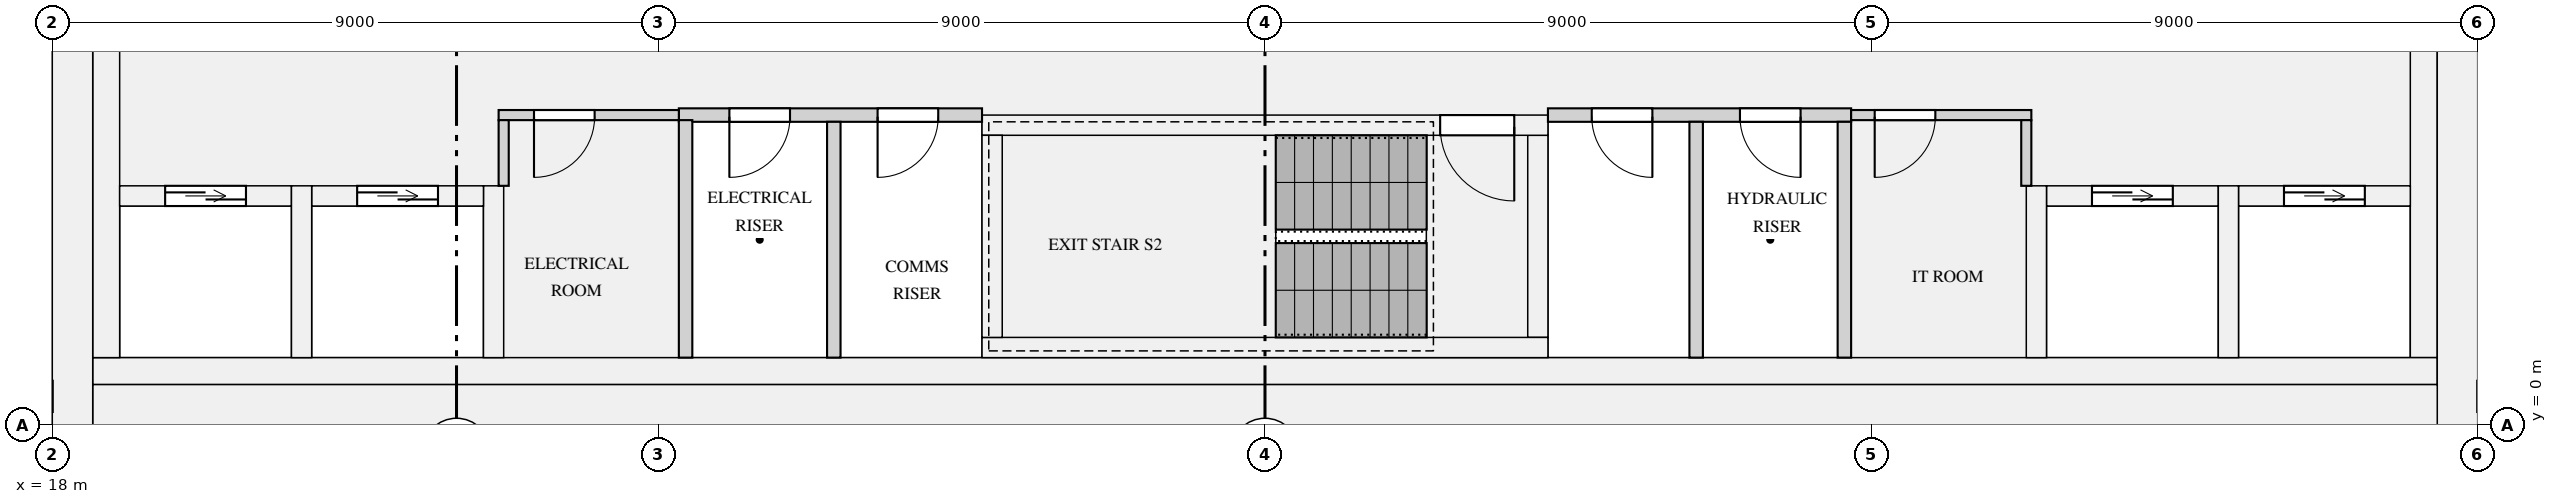
"""IFC4 building model, lengths in metres.
Left out: names, types, materials, properties, quantities, classifications, styles, units other than length and angle.
Written with IfcOpenShell. Run it as: python <this file> out.ifc"""

import sys

from ifc_helpers import new_model, si_unit, direction, frame, frame_2d, origin, place, context, subcontext, project, spatial, rectangle, extrude, element, fill, save


model = new_model("IFC4")
c1 = context("Model", 3, precision=1e-05, world=origin(), true_north=direction((0.0, 1.0)))
c2 = subcontext(c1, "Body", "Model", "MODEL_VIEW")
j1 = project(units=[si_unit("LENGTHUNIT", "METRE"), si_unit("PLANEANGLEUNIT", "RADIAN")], contexts=[c1])
p1 = place(None, origin())
s1 = spatial("IfcSite", under=j1, at=p1, CompositionType="ELEMENT")
p2 = place(p1, origin())
s2 = spatial("IfcBuilding", under=s1, at=p2, CompositionType="ELEMENT")
p3 = place(p2, frame((0.0, 0.0, 223.2)))
s3 = spatial("IfcBuildingStorey", under=s2, at=p3, CompositionType="ELEMENT", Elevation=223.2)
for number, where, z_axis, x_axis in (
    (1, (18.3, 0.0, 0.0), (0.0, 0.0, 1.0), (0.0, 1.0, 0.0)),
    (2, (53.7, 0.0, 0.0), (0.0, 0.0, 1.0), (0.0, 1.0, 0.0)),
):
    element("IfcWall", number, at=place(p3, frame(where, z_axis=z_axis, x_axis=x_axis)), inside=s3, PredefinedType="SHEAR", context=c2, shape_type="SweptSolid", body=[
        extrude(rectangle(XDim=12.5, YDim=0.6, at=frame_2d((6.25, 0.0))), origin(), (0.0, 0.0, 1.0), 3.15),
    ])
p4 = place(p3, frame((18.6, 0.3, 0.0), z_axis=(0.0, 0.0, 1.0), x_axis=(1.0, 0.0, 0.0)))
e3 = element("IfcWall", 3, at=p4, inside=s3, PredefinedType="SHEAR", context=c2, shape_type="SweptSolid", body=[
    extrude(rectangle(XDim=34.8, YDim=0.6, at=frame_2d((17.4, 0.0))), origin(), (0.0, 0.0, 1.0), 3.15),
])
for number, where, z_axis, x_axis in (
    (4, (18.8, 1.0, 0.0), (0.0, 0.0, 1.0), (0.0, 1.0, 0.0)),
    (5, (53.2, 1.0, 0.0), (0.0, 0.0, 1.0), (0.0, 1.0, 0.0)),
):
    element("IfcWall", number, at=place(p3, frame(where, z_axis=z_axis, x_axis=x_axis)), inside=s3, PredefinedType="SHEAR", context=c2, shape_type="SweptSolid", body=[
        extrude(rectangle(XDim=10.9, YDim=0.4, at=frame_2d((5.45, 0.0))), origin(), (0.0, 0.0, 1.0), 3.15),
    ])
p5 = place(p3, frame((18.6, 0.8, 0.0), z_axis=(0.0, 0.0, 1.0), x_axis=(1.0, 0.0, 0.0)))
e6 = element("IfcWall", 6, at=p5, inside=s3, PredefinedType="SHEAR", context=c2, shape_type="SweptSolid", body=[
    extrude(rectangle(XDim=34.8, YDim=0.4, at=frame_2d((17.4, 0.0))), origin(), (0.0, 0.0, 1.0), 3.15),
])
p6 = place(p3, frame((19.0, 3.4, 0.0), z_axis=(0.0, 0.0, 1.0), x_axis=(1.0, 0.0, 0.0)))
e7 = element("IfcWall", 7, at=p6, inside=s3, PredefinedType="SHEAR", context=c2, shape_type="SweptSolid", body=[
    extrude(rectangle(XDim=2.55, YDim=0.3, at=frame_2d((1.275, 0.0))), origin(), (0.0, 0.0, 1.0), 3.15),
])
p7 = place(p6, frame((0.675, 0.0, 0.0)))
e8 = element("IfcOpeningElement", 8, at=p7, cuts=e7, PredefinedType="OPENING", context=c2, shape_type="SweptSolid", body=[
    extrude(rectangle(XDim=1.2, YDim=2.1, at=frame_2d((0.6, 1.05))), frame((0.0, 0.16, 0.0), z_axis=(0.0, -1.0, 0.0), x_axis=(1.0, 0.0, 0.0)), (0.0, 0.0, 1.0), 0.32),
])
p8 = place(p3, frame((21.85, 3.4, 0.0), z_axis=(0.0, 0.0, 1.0), x_axis=(1.0, 0.0, 0.0)))
e9 = element("IfcWall", 9, at=p8, inside=s3, PredefinedType="SHEAR", context=c2, shape_type="SweptSolid", body=[
    extrude(rectangle(XDim=2.55, YDim=0.3, at=frame_2d((1.275, 0.0))), origin(), (0.0, 0.0, 1.0), 3.15),
])
p9 = place(p8, frame((0.675, 0.0, 0.0)))
e10 = element("IfcOpeningElement", 10, at=p9, cuts=e9, PredefinedType="OPENING", context=c2, shape_type="SweptSolid", body=[
    extrude(rectangle(XDim=1.2, YDim=2.1, at=frame_2d((0.6, 1.05))), frame((0.0, 0.16, 0.0), z_axis=(0.0, -1.0, 0.0), x_axis=(1.0, 0.0, 0.0)), (0.0, 0.0, 1.0), 0.32),
])
for number, where, z_axis, x_axis in (
    (11, (21.7, 1.0, 0.0), (0.0, 0.0, 1.0), (0.0, 1.0, 0.0)),
    (12, (24.55, 1.0, 0.0), (0.0, 0.0, 1.0), (0.0, 1.0, 0.0)),
):
    element("IfcWall", number, at=place(p3, frame(where, z_axis=z_axis, x_axis=x_axis)), inside=s3, PredefinedType="SHEAR", context=c2, shape_type="SweptSolid", body=[
        extrude(rectangle(XDim=2.55, YDim=0.3, at=frame_2d((1.275, 0.0))), origin(), (0.0, 0.0, 1.0), 3.15),
    ])
p10 = place(p3, frame((47.6, 3.4, 0.0), z_axis=(0.0, 0.0, 1.0), x_axis=(1.0, 0.0, 0.0)))
e13 = element("IfcWall", 13, at=p10, inside=s3, PredefinedType="SHEAR", context=c2, shape_type="SweptSolid", body=[
    extrude(rectangle(XDim=2.55, YDim=0.3, at=frame_2d((1.275, 0.0))), origin(), (0.0, 0.0, 1.0), 3.15),
])
p11 = place(p10, frame((0.675, 0.0, 0.0)))
e14 = element("IfcOpeningElement", 14, at=p11, cuts=e13, PredefinedType="OPENING", context=c2, shape_type="SweptSolid", body=[
    extrude(rectangle(XDim=1.2, YDim=2.1, at=frame_2d((0.6, 1.05))), frame((0.0, 0.16, 0.0), z_axis=(0.0, -1.0, 0.0), x_axis=(1.0, 0.0, 0.0)), (0.0, 0.0, 1.0), 0.32),
])
p12 = place(p3, frame((47.45, 1.0, 0.0), z_axis=(0.0, 0.0, 1.0), x_axis=(0.0, 1.0, 0.0)))
e15 = element("IfcWall", 15, at=p12, inside=s3, PredefinedType="SHEAR", context=c2, shape_type="SweptSolid", body=[
    extrude(rectangle(XDim=2.55, YDim=0.3, at=frame_2d((1.275, 0.0))), origin(), (0.0, 0.0, 1.0), 3.15),
])
p13 = place(p3, frame((50.45, 3.4, 0.0), z_axis=(0.0, 0.0, 1.0), x_axis=(1.0, 0.0, 0.0)))
e16 = element("IfcWall", 16, at=p13, inside=s3, PredefinedType="SHEAR", context=c2, shape_type="SweptSolid", body=[
    extrude(rectangle(XDim=2.55, YDim=0.3, at=frame_2d((1.275, 0.0))), origin(), (0.0, 0.0, 1.0), 3.15),
])
p14 = place(p13, frame((0.675, 0.0, 0.0)))
e17 = element("IfcOpeningElement", 17, at=p14, cuts=e16, PredefinedType="OPENING", context=c2, shape_type="SweptSolid", body=[
    extrude(rectangle(XDim=1.2, YDim=2.1, at=frame_2d((0.6, 1.05))), frame((0.0, 0.16, 0.0), z_axis=(0.0, -1.0, 0.0), x_axis=(1.0, 0.0, 0.0)), (0.0, 0.0, 1.0), 0.32),
])
p15 = place(p3, frame((50.3, 1.0, 0.0), z_axis=(0.0, 0.0, 1.0), x_axis=(0.0, 1.0, 0.0)))
e18 = element("IfcWall", 18, at=p15, inside=s3, PredefinedType="SHEAR", context=c2, shape_type="SweptSolid", body=[
    extrude(rectangle(XDim=2.55, YDim=0.3, at=frame_2d((1.275, 0.0))), origin(), (0.0, 0.0, 1.0), 3.15),
])
p16 = place(p3, frame((31.8, 1.15, 0.0), z_axis=(0.0, 0.0, 1.0), x_axis=(1.0, 0.0, 0.0)))
e19 = element("IfcWall", 19, at=p16, inside=s3, PredefinedType="SHEAR", context=c2, shape_type="SweptSolid", body=[
    extrude(rectangle(XDim=8.4, YDim=0.3, at=frame_2d((4.2, 0.0))), origin(), (0.0, 0.0, 1.0), 3.15),
])
p17 = place(p3, frame((31.8, 4.45, 0.0), z_axis=(0.0, 0.0, 1.0), x_axis=(1.0, 0.0, 0.0)))
e20 = element("IfcWall", 20, at=p17, inside=s3, PredefinedType="SHEAR", context=c2, shape_type="SweptSolid", body=[
    extrude(rectangle(XDim=8.4, YDim=0.3, at=frame_2d((4.2, 0.0))), origin(), (0.0, 0.0, 1.0), 3.15),
])
p18 = place(p17, frame((6.8, 0.0, 0.0)))
e21 = element("IfcOpeningElement", 21, at=p18, cuts=e20, PredefinedType="OPENING", context=c2, shape_type="SweptSolid", body=[
    extrude(rectangle(XDim=1.1, YDim=2.1, at=frame_2d((0.55, 1.05))), frame((0.0, 0.16, 0.0), z_axis=(0.0, -1.0, 0.0), x_axis=(1.0, 0.0, 0.0)), (0.0, 0.0, 1.0), 0.32),
])
for number, where, z_axis, x_axis in (
    (22, (31.95, 1.3, 0.0), (0.0, 0.0, 1.0), (0.0, 1.0, 0.0)),
    (23, (40.05, 1.3, 0.0), (0.0, 0.0, 1.0), (0.0, 1.0, 0.0)),
):
    element("IfcWall", number, at=place(p3, frame(where, z_axis=z_axis, x_axis=x_axis)), inside=s3, PredefinedType="SHEAR", context=c2, shape_type="SweptSolid", body=[
        extrude(rectangle(XDim=3.0, YDim=0.3, at=frame_2d((1.5, 0.0))), origin(), (0.0, 0.0, 1.0), 3.15),
    ])
p19 = place(p3, frame((54.0, 0.425, 0.9), z_axis=(0.0, 0.0, 1.0), x_axis=(1.0, 0.0, 0.0)))
e24 = element("IfcWall", 24, at=p19, inside=s3, PredefinedType="SOLIDWALL", context=c2, shape_type="SweptSolid", body=[
    extrude(rectangle(XDim=4.05, YDim=0.45, at=frame_2d((2.025, 0.0))), origin(), (0.0, 0.0, 1.0), 1.93),
])
p20 = place(p19, frame((1.275, 0.0, 0.15)))
e25 = element("IfcOpeningElement", 25, at=p20, cuts=e24, PredefinedType="OPENING", context=c2, shape_type="SweptSolid", body=[
    extrude(rectangle(XDim=1.5, YDim=1.5, at=frame_2d((0.75, 0.75))), frame((0.0, 0.235, 0.0), z_axis=(0.0, -1.0, 0.0), x_axis=(1.0, 0.0, 0.0)), (0.0, 0.0, 1.0), 0.47),
])
p21 = place(p3, frame((27.3, 4.6, 0.0), z_axis=(0.0, 0.0, 1.0), x_axis=(1.0, 0.0, 0.0)))
e26 = element("IfcWall", 26, at=p21, inside=s3, PredefinedType="PARTITIONING", context=c2, shape_type="SweptSolid", body=[
    extrude(rectangle(XDim=4.5, YDim=0.2, at=frame_2d((2.25, 0.0))), origin(), (0.0, 0.0, 1.0), 2.83),
])
p22 = place(p21, frame((0.75, 0.0, 0.0)))
e27 = element("IfcOpeningElement", 27, at=p22, cuts=e26, PredefinedType="OPENING", context=c2, shape_type="SweptSolid", body=[
    extrude(rectangle(XDim=0.9, YDim=2.1, at=frame_2d((0.45, 1.05))), frame((0.0, 0.11, 0.0), z_axis=(0.0, -1.0, 0.0), x_axis=(1.0, 0.0, 0.0)), (0.0, 0.0, 1.0), 0.22),
])
p23 = place(p21, frame((2.95, 0.0, 0.0)))
e28 = element("IfcOpeningElement", 28, at=p23, cuts=e26, PredefinedType="OPENING", context=c2, shape_type="SweptSolid", body=[
    extrude(rectangle(XDim=0.9, YDim=2.1, at=frame_2d((0.45, 1.05))), frame((0.0, 0.11, 0.0), z_axis=(0.0, -1.0, 0.0), x_axis=(1.0, 0.0, 0.0)), (0.0, 0.0, 1.0), 0.22),
])
p24 = place(p3, frame((40.2, 4.6, 0.0), z_axis=(0.0, 0.0, 1.0), x_axis=(1.0, 0.0, 0.0)))
e29 = element("IfcWall", 29, at=p24, inside=s3, PredefinedType="PARTITIONING", context=c2, shape_type="SweptSolid", body=[
    extrude(rectangle(XDim=4.5, YDim=0.2, at=frame_2d((2.25, 0.0))), origin(), (0.0, 0.0, 1.0), 2.83),
])
p25 = place(p24, frame((0.65, 0.0, 0.0)))
e30 = element("IfcOpeningElement", 30, at=p25, cuts=e29, PredefinedType="OPENING", context=c2, shape_type="SweptSolid", body=[
    extrude(rectangle(XDim=0.9, YDim=2.1, at=frame_2d((0.45, 1.05))), frame((0.0, 0.11, 0.0), z_axis=(0.0, -1.0, 0.0), x_axis=(1.0, 0.0, 0.0)), (0.0, 0.0, 1.0), 0.22),
])
p26 = place(p24, frame((2.85, 0.0, 0.0)))
e31 = element("IfcOpeningElement", 31, at=p26, cuts=e29, PredefinedType="OPENING", context=c2, shape_type="SweptSolid", body=[
    extrude(rectangle(XDim=0.9, YDim=2.1, at=frame_2d((0.45, 1.05))), frame((0.0, 0.11, 0.0), z_axis=(0.0, -1.0, 0.0), x_axis=(1.0, 0.0, 0.0)), (0.0, 0.0, 1.0), 0.22),
])
p27 = place(p3, frame((24.625, 4.6, 0.0), z_axis=(0.0, 0.0, 1.0), x_axis=(1.0, 0.0, 0.0)))
e32 = element("IfcWall", 32, at=p27, inside=s3, PredefinedType="PARTITIONING", context=c2, shape_type="SweptSolid", body=[
    extrude(rectangle(XDim=2.675, YDim=0.15, at=frame_2d((1.337, 0.0))), origin(), (0.0, 0.0, 1.0), 2.83),
])
p28 = place(p27, frame((0.525, 0.0, 0.0)))
e33 = element("IfcOpeningElement", 33, at=p28, cuts=e32, PredefinedType="OPENING", context=c2, shape_type="SweptSolid", body=[
    extrude(rectangle(XDim=0.9, YDim=2.1, at=frame_2d((0.45, 1.05))), frame((0.0, 0.085, 0.0), z_axis=(0.0, -1.0, 0.0), x_axis=(1.0, 0.0, 0.0)), (0.0, 0.0, 1.0), 0.17),
])
p29 = place(p3, frame((44.7, 4.6, 0.0), z_axis=(0.0, 0.0, 1.0), x_axis=(1.0, 0.0, 0.0)))
e34 = element("IfcWall", 34, at=p29, inside=s3, PredefinedType="PARTITIONING", context=c2, shape_type="SweptSolid", body=[
    extrude(rectangle(XDim=2.675, YDim=0.15, at=frame_2d((1.337, 0.0))), origin(), (0.0, 0.0, 1.0), 2.83),
])
p30 = place(p29, frame((0.35, 0.0, 0.0)))
e35 = element("IfcOpeningElement", 35, at=p30, cuts=e34, PredefinedType="OPENING", context=c2, shape_type="SweptSolid", body=[
    extrude(rectangle(XDim=0.9, YDim=2.1, at=frame_2d((0.45, 1.05))), frame((0.0, 0.085, 0.0), z_axis=(0.0, -1.0, 0.0), x_axis=(1.0, 0.0, 0.0)), (0.0, 0.0, 1.0), 0.17),
])
p31 = place(p3, frame((27.4, 1.0, 0.0), z_axis=(0.0, 0.0, 1.0), x_axis=(0.0, 1.0, 0.0)))
e36 = element("IfcWall", 36, at=p31, inside=s3, PredefinedType="PARTITIONING", context=c2, shape_type="SweptSolid", body=[
    extrude(rectangle(XDim=3.525, YDim=0.2, at=frame_2d((1.762, 0.0))), origin(), (0.0, 0.0, 1.0), 2.83),
])
for number, where, z_axis, x_axis in (
    (37, (29.6, 1.0, 0.0), (0.0, 0.0, 1.0), (0.0, 1.0, 0.0)),
    (38, (42.4, 1.0, 0.0), (0.0, 0.0, 1.0), (0.0, 1.0, 0.0)),
    (39, (44.6, 1.0, 0.0), (0.0, 0.0, 1.0), (0.0, 1.0, 0.0)),
):
    element("IfcWall", number, at=place(p3, frame(where, z_axis=z_axis, x_axis=x_axis)), inside=s3, PredefinedType="PARTITIONING", context=c2, shape_type="SweptSolid", body=[
        extrude(rectangle(XDim=3.5, YDim=0.2, at=frame_2d((1.75, 0.0))), origin(), (0.0, 0.0, 1.0), 2.83),
    ])
for number, where, z_axis, x_axis in (
    (40, (24.7, 3.55, 0.0), (0.0, 0.0, 1.0), (0.0, 1.0, 0.0)),
    (41, (47.3, 3.55, 0.0), (0.0, 0.0, 1.0), (0.0, 1.0, 0.0)),
):
    element("IfcWall", number, at=place(p3, frame(where, z_axis=z_axis, x_axis=x_axis)), inside=s3, PredefinedType="PARTITIONING", context=c2, shape_type="SweptSolid", body=[
        extrude(rectangle(XDim=0.975, YDim=0.15, at=frame_2d((0.487, 0.0))), origin(), (0.0, 0.0, 1.0), 2.83),
    ])
p32 = place(p7, origin())
e42 = element("IfcDoor", 42, at=p32, inside=s3, OperationType="DOUBLE_DOOR_SLIDING", PredefinedType="DOOR", context=c2, shape_type="SweptSolid", body=[
    extrude(rectangle(XDim=1.2, YDim=2.1, at=frame_2d((0.6, 1.05))), frame((0.0, 0.025, 0.0), z_axis=(0.0, -1.0, 0.0), x_axis=(1.0, 0.0, 0.0)), (0.0, 0.0, 1.0), 0.05),
])
fill(e8, e42)
p33 = place(p9, origin())
e43 = element("IfcDoor", 43, at=p33, inside=s3, OperationType="DOUBLE_DOOR_SLIDING", PredefinedType="DOOR", context=c2, shape_type="SweptSolid", body=[
    extrude(rectangle(XDim=1.2, YDim=2.1, at=frame_2d((0.6, 1.05))), frame((0.0, 0.025, 0.0), z_axis=(0.0, -1.0, 0.0), x_axis=(1.0, 0.0, 0.0)), (0.0, 0.0, 1.0), 0.05),
])
fill(e10, e43)
p34 = place(p11, origin())
e44 = element("IfcDoor", 44, at=p34, inside=s3, OperationType="DOUBLE_DOOR_SLIDING", PredefinedType="DOOR", context=c2, shape_type="SweptSolid", body=[
    extrude(rectangle(XDim=1.2, YDim=2.1, at=frame_2d((0.6, 1.05))), frame((0.0, 0.025, 0.0), z_axis=(0.0, -1.0, 0.0), x_axis=(1.0, 0.0, 0.0)), (0.0, 0.0, 1.0), 0.05),
])
fill(e14, e44)
p35 = place(p14, origin())
e45 = element("IfcDoor", 45, at=p35, inside=s3, OperationType="DOUBLE_DOOR_SLIDING", PredefinedType="DOOR", context=c2, shape_type="SweptSolid", body=[
    extrude(rectangle(XDim=1.2, YDim=2.1, at=frame_2d((0.6, 1.05))), frame((0.0, 0.025, 0.0), z_axis=(0.0, -1.0, 0.0), x_axis=(1.0, 0.0, 0.0)), (0.0, 0.0, 1.0), 0.05),
])
fill(e17, e45)
p36 = place(p18, frame((1.1, 0.0, 0.0), z_axis=(0.0, 0.0, 1.0), x_axis=(-1.0, 0.0, 0.0)))
e46 = element("IfcDoor", 46, at=p36, inside=s3, OperationType="SINGLE_SWING_LEFT", PredefinedType="DOOR", context=c2, shape_type="SweptSolid", body=[
    extrude(rectangle(XDim=1.1, YDim=2.1, at=frame_2d((0.55, 1.05))), frame((0.0, 0.025, 0.0), z_axis=(0.0, -1.0, 0.0), x_axis=(1.0, 0.0, 0.0)), (0.0, 0.0, 1.0), 0.05),
])
fill(e21, e46)
p37 = place(p28, frame((0.9, 0.0, 0.0), z_axis=(0.0, 0.0, 1.0), x_axis=(-1.0, 0.0, 0.0)))
e47 = element("IfcDoor", 47, at=p37, inside=s3, OperationType="SINGLE_SWING_RIGHT", PredefinedType="DOOR", context=c2, shape_type="SweptSolid", body=[
    extrude(rectangle(XDim=0.9, YDim=2.1, at=frame_2d((0.45, 1.05))), frame((0.0, 0.025, 0.0), z_axis=(0.0, -1.0, 0.0), x_axis=(1.0, 0.0, 0.0)), (0.0, 0.0, 1.0), 0.05),
])
fill(e33, e47)
p38 = place(p30, frame((0.9, 0.0, 0.0), z_axis=(0.0, 0.0, 1.0), x_axis=(-1.0, 0.0, 0.0)))
e48 = element("IfcDoor", 48, at=p38, inside=s3, OperationType="SINGLE_SWING_RIGHT", PredefinedType="DOOR", context=c2, shape_type="SweptSolid", body=[
    extrude(rectangle(XDim=0.9, YDim=2.1, at=frame_2d((0.45, 1.05))), frame((0.0, 0.025, 0.0), z_axis=(0.0, -1.0, 0.0), x_axis=(1.0, 0.0, 0.0)), (0.0, 0.0, 1.0), 0.05),
])
fill(e35, e48)
p39 = place(p22, frame((0.9, 0.0, 0.0), z_axis=(0.0, 0.0, 1.0), x_axis=(-1.0, 0.0, 0.0)))
e49 = element("IfcDoor", 49, at=p39, inside=s3, OperationType="SINGLE_SWING_RIGHT", PredefinedType="DOOR", context=c2, shape_type="SweptSolid", body=[
    extrude(rectangle(XDim=0.9, YDim=2.1, at=frame_2d((0.45, 1.05))), frame((0.0, 0.025, 0.0), z_axis=(0.0, -1.0, 0.0), x_axis=(1.0, 0.0, 0.0)), (0.0, 0.0, 1.0), 0.05),
])
fill(e27, e49)
p40 = place(p23, frame((0.9, 0.0, 0.0), z_axis=(0.0, 0.0, 1.0), x_axis=(-1.0, 0.0, 0.0)))
e50 = element("IfcDoor", 50, at=p40, inside=s3, OperationType="SINGLE_SWING_RIGHT", PredefinedType="DOOR", context=c2, shape_type="SweptSolid", body=[
    extrude(rectangle(XDim=0.9, YDim=2.1, at=frame_2d((0.45, 1.05))), frame((0.0, 0.025, 0.0), z_axis=(0.0, -1.0, 0.0), x_axis=(1.0, 0.0, 0.0)), (0.0, 0.0, 1.0), 0.05),
])
fill(e28, e50)
p41 = place(p25, frame((0.9, 0.0, 0.0), z_axis=(0.0, 0.0, 1.0), x_axis=(-1.0, 0.0, 0.0)))
e51 = element("IfcDoor", 51, at=p41, inside=s3, OperationType="SINGLE_SWING_LEFT", PredefinedType="DOOR", context=c2, shape_type="SweptSolid", body=[
    extrude(rectangle(XDim=0.9, YDim=2.1, at=frame_2d((0.45, 1.05))), frame((0.0, 0.025, 0.0), z_axis=(0.0, -1.0, 0.0), x_axis=(1.0, 0.0, 0.0)), (0.0, 0.0, 1.0), 0.05),
])
fill(e30, e51)
p42 = place(p26, frame((0.9, 0.0, 0.0), z_axis=(0.0, 0.0, 1.0), x_axis=(-1.0, 0.0, 0.0)))
e52 = element("IfcDoor", 52, at=p42, inside=s3, OperationType="SINGLE_SWING_LEFT", PredefinedType="DOOR", context=c2, shape_type="SweptSolid", body=[
    extrude(rectangle(XDim=0.9, YDim=2.1, at=frame_2d((0.45, 1.05))), frame((0.0, 0.025, 0.0), z_axis=(0.0, -1.0, 0.0), x_axis=(1.0, 0.0, 0.0)), (0.0, 0.0, 1.0), 0.05),
])
fill(e31, e52)
save(model, sys.argv[1])
